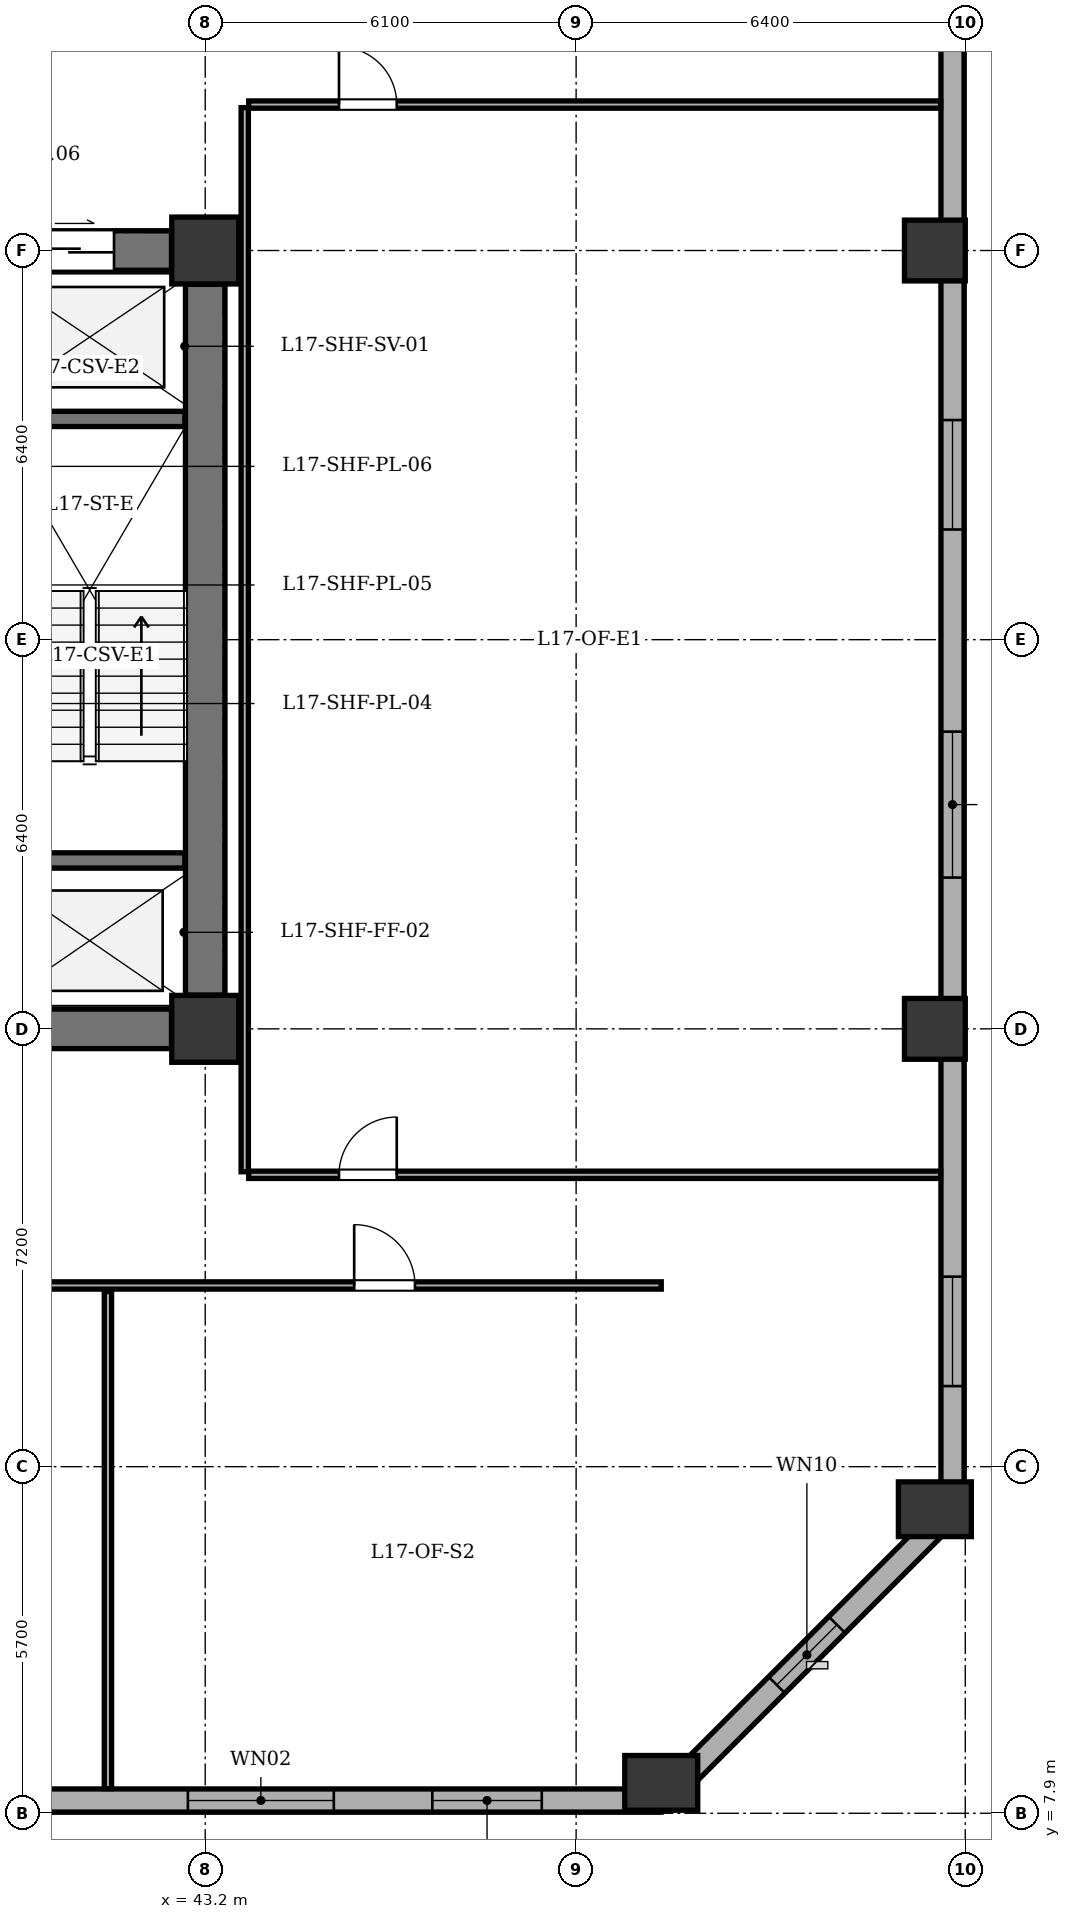
"""IFC4 building model, lengths in metres.
Left out: names, types, materials, properties, quantities, classifications, styles, units other than length and angle.
Written with IfcOpenShell. Run it as: python <this file> out.ifc"""

import sys

from ifc_helpers import new_model, si_unit, direction, frame, frame_2d, origin, origin_2d, place, context, subcontext, project, spatial, rectangle, extrude, element, fill, save


model = new_model("IFC4")
c1 = context("Model", 3, precision=1e-05, world=origin(), true_north=direction((0.0, 1.0)))
c2 = subcontext(c1, "Body", "Model", "MODEL_VIEW")
j1 = project(units=[si_unit("LENGTHUNIT", "METRE"), si_unit("PLANEANGLEUNIT", "RADIAN")], contexts=[c1])
p1 = place(None, origin())
s1 = spatial("IfcSite", under=j1, at=p1, CompositionType="ELEMENT")
p2 = place(p1, origin())
s2 = spatial("IfcBuilding", under=s1, at=p2, CompositionType="ELEMENT")
p3 = place(p2, frame((0.0, 0.0, 71.1)))
s3 = spatial("IfcBuildingStorey", under=s2, at=p3, CompositionType="ELEMENT", Elevation=71.1)
for number, where, z_axis, x_axis in (
    (1, (43.2, 20.8, 0.0), (0.0, 0.0, 1.0), (1.0, 0.0, 0.0)),
    (2, (43.2, 33.6, 0.0), (0.0, 0.0, 1.0), (1.0, 0.0, 0.0)),
):
    element("IfcColumn", number, at=place(p3, frame(where, z_axis=z_axis, x_axis=x_axis)), inside=s3, PredefinedType="COLUMN", context=c2, shape_type="SweptSolid", body=[
        extrude(rectangle(XDim=1.1, YDim=1.1, at=origin_2d()), origin(), (0.0, 0.0, 1.0), 3.9),
    ])
for number, where, z_axis, x_axis in (
    (3, (50.7, 8.4, 0.0), (0.0, 0.0, 1.0), (1.0, 0.0, 0.0)),
    (4, (55.2, 12.9, 0.0), (0.0, 0.0, 1.0), (1.0, 0.0, 0.0)),
):
    element("IfcColumn", number, at=place(p3, frame(where, z_axis=z_axis, x_axis=x_axis)), inside=s3, PredefinedType="COLUMN", context=c2, shape_type="SweptSolid", body=[
        extrude(rectangle(XDim=0.9, YDim=1.2, at=origin_2d()), origin(), (0.0, 0.0, 1.0), 3.9),
    ])
for number, where, z_axis, x_axis in (
    (5, (55.2, 20.8, 0.0), (0.0, 0.0, 1.0), (1.0, 0.0, 0.0)),
    (6, (55.2, 33.6, 0.0), (0.0, 0.0, 1.0), (1.0, 0.0, 0.0)),
):
    element("IfcColumn", number, at=place(p3, frame(where, z_axis=z_axis, x_axis=x_axis)), inside=s3, PredefinedType="COLUMN", context=c2, shape_type="SweptSolid", body=[
        extrude(rectangle(XDim=1.0, YDim=1.0, at=origin_2d()), origin(), (0.0, 0.0, 1.0), 3.9),
    ])
p4 = place(p3, frame((50.7, 8.11, 0.0), z_axis=(0.0, 0.0, 1.0), x_axis=(-1.0, 0.0, 0.0)))
e7 = element("IfcWall", 7, at=p4, inside=s3, PredefinedType="STANDARD", context=c2, shape_type="SweptSolid", body=[
    extrude(rectangle(XDim=35.0, YDim=0.38, at=frame_2d((17.5, 0.0))), origin(), (0.0, 0.0, 1.0), 3.135),
])
p5 = place(p4, frame((24.65, 0.0, 0.0)))
e8 = element("IfcOpeningElement", 8, at=p5, cuts=e7, PredefinedType="OPENING", context=c2, shape_type="SweptSolid", body=[
    extrude(rectangle(XDim=1.1, YDim=2.05, at=frame_2d((0.55, 1.025))), frame((0.0, 0.2, 0.0), z_axis=(0.0, -1.0, 0.0), x_axis=(1.0, 0.0, 0.0)), (0.0, 0.0, 1.0), 0.4),
])
p6 = place(p4, frame((1.965, 0.0, 0.8)))
e9 = element("IfcOpeningElement", 9, at=p6, cuts=e7, PredefinedType="OPENING", context=c2, shape_type="SweptSolid", body=[
    extrude(rectangle(XDim=1.8, YDim=1.9, at=frame_2d((0.9, 0.95))), frame((0.0, 0.2, 0.0), z_axis=(0.0, -1.0, 0.0), x_axis=(1.0, 0.0, 0.0)), (0.0, 0.0, 1.0), 0.4),
])
p7 = place(p4, frame((5.385, 0.0, 0.8)))
e10 = element("IfcOpeningElement", 10, at=p7, cuts=e7, PredefinedType="OPENING", context=c2, shape_type="SweptSolid", body=[
    extrude(rectangle(XDim=2.4, YDim=1.9, at=frame_2d((1.2, 0.95))), frame((0.0, 0.2, 0.0), z_axis=(0.0, -1.0, 0.0), x_axis=(1.0, 0.0, 0.0)), (0.0, 0.0, 1.0), 0.4),
])
p8 = place(p4, frame((11.275, 0.0, 0.8)))
e11 = element("IfcOpeningElement", 11, at=p8, cuts=e7, PredefinedType="OPENING", context=c2, shape_type="SweptSolid", body=[
    extrude(rectangle(XDim=1.8, YDim=1.9, at=frame_2d((0.9, 0.95))), frame((0.0, 0.2, 0.0), z_axis=(0.0, -1.0, 0.0), x_axis=(1.0, 0.0, 0.0)), (0.0, 0.0, 1.0), 0.4),
])
p9 = place(p4, frame((16.832, 0.0, 0.8)))
e12 = element("IfcOpeningElement", 12, at=p9, cuts=e7, PredefinedType="OPENING", context=c2, shape_type="SweptSolid", body=[
    extrude(rectangle(XDim=1.8, YDim=1.9, at=frame_2d((0.9, 0.95))), frame((0.0, 0.2, 0.0), z_axis=(0.0, -1.0, 0.0), x_axis=(1.0, 0.0, 0.0)), (0.0, 0.0, 1.0), 0.4),
])
p10 = place(p4, frame((19.568, 0.0, 0.8)))
e13 = element("IfcOpeningElement", 13, at=p10, cuts=e7, PredefinedType="OPENING", context=c2, shape_type="SweptSolid", body=[
    extrude(rectangle(XDim=1.8, YDim=1.9, at=frame_2d((0.9, 0.95))), frame((0.0, 0.2, 0.0), z_axis=(0.0, -1.0, 0.0), x_axis=(1.0, 0.0, 0.0)), (0.0, 0.0, 1.0), 0.4),
])
p11 = place(p4, frame((26.925, 0.0, 0.8)))
e14 = element("IfcOpeningElement", 14, at=p11, cuts=e7, PredefinedType="OPENING", context=c2, shape_type="SweptSolid", body=[
    extrude(rectangle(XDim=1.8, YDim=1.9, at=frame_2d((0.9, 0.95))), frame((0.0, 0.2, 0.0), z_axis=(0.0, -1.0, 0.0), x_axis=(1.0, 0.0, 0.0)), (0.0, 0.0, 1.0), 0.4),
])
p12 = place(p4, frame((31.5, 0.0, 0.8)))
e15 = element("IfcOpeningElement", 15, at=p12, cuts=e7, PredefinedType="OPENING", context=c2, shape_type="SweptSolid", body=[
    extrude(rectangle(XDim=1.8, YDim=1.9, at=frame_2d((0.9, 0.95))), frame((0.0, 0.2, 0.0), z_axis=(0.0, -1.0, 0.0), x_axis=(1.0, 0.0, 0.0)), (0.0, 0.0, 1.0), 0.4),
])
p13 = place(p3, frame((55.49, 47.9, 0.0), z_axis=(0.0, 0.0, 1.0), x_axis=(0.0, -1.0, 0.0)))
e16 = element("IfcWall", 16, at=p13, inside=s3, PredefinedType="STANDARD", context=c2, shape_type="SweptSolid", body=[
    extrude(rectangle(XDim=35.0, YDim=0.38, at=frame_2d((17.5, 0.0))), origin(), (0.0, 0.0, 1.0), 3.135),
])
p14 = place(p13, frame((2.693, 0.0, 0.8)))
e17 = element("IfcOpeningElement", 17, at=p14, cuts=e16, PredefinedType="OPENING", context=c2, shape_type="SweptSolid", body=[
    extrude(rectangle(XDim=1.8, YDim=1.9, at=frame_2d((0.9, 0.95))), frame((0.0, 0.2, 0.0), z_axis=(0.0, -1.0, 0.0), x_axis=(1.0, 0.0, 0.0)), (0.0, 0.0, 1.0), 0.4),
])
p15 = place(p13, frame((7.457, 0.0, 0.8)))
e18 = element("IfcOpeningElement", 18, at=p15, cuts=e16, PredefinedType="OPENING", context=c2, shape_type="SweptSolid", body=[
    extrude(rectangle(XDim=2.4, YDim=1.9, at=frame_2d((1.2, 0.95))), frame((0.0, 0.2, 0.0), z_axis=(0.0, -1.0, 0.0), x_axis=(1.0, 0.0, 0.0)), (0.0, 0.0, 1.0), 0.4),
])
p16 = place(p13, frame((17.088, 0.0, 0.8)))
e19 = element("IfcOpeningElement", 19, at=p16, cuts=e16, PredefinedType="OPENING", context=c2, shape_type="SweptSolid", body=[
    extrude(rectangle(XDim=1.8, YDim=1.9, at=frame_2d((0.9, 0.95))), frame((0.0, 0.2, 0.0), z_axis=(0.0, -1.0, 0.0), x_axis=(1.0, 0.0, 0.0)), (0.0, 0.0, 1.0), 0.4),
])
p17 = place(p13, frame((22.212, 0.0, 0.8)))
e20 = element("IfcOpeningElement", 20, at=p17, cuts=e16, PredefinedType="OPENING", context=c2, shape_type="SweptSolid", body=[
    extrude(rectangle(XDim=2.4, YDim=1.9, at=frame_2d((1.2, 0.95))), frame((0.0, 0.2, 0.0), z_axis=(0.0, -1.0, 0.0), x_axis=(1.0, 0.0, 0.0)), (0.0, 0.0, 1.0), 0.4),
])
p18 = place(p13, frame((31.175, 0.0, 0.8)))
e21 = element("IfcOpeningElement", 21, at=p18, cuts=e16, PredefinedType="OPENING", context=c2, shape_type="SweptSolid", body=[
    extrude(rectangle(XDim=1.8, YDim=1.9, at=frame_2d((0.9, 0.95))), frame((0.0, 0.2, 0.0), z_axis=(0.0, -1.0, 0.0), x_axis=(1.0, 0.0, 0.0)), (0.0, 0.0, 1.0), 0.4),
])
p19 = place(p3, frame((55.49, 12.9, 0.0), z_axis=(0.0, 0.0, 1.0), x_axis=(-0.707124801467, -0.707088760447, 0.0)))
e22 = element("IfcWall", 22, at=p19, inside=s3, PredefinedType="STANDARD", context=c2, shape_type="SweptSolid", body=[
    extrude(rectangle(XDim=6.774, YDim=0.38, at=frame_2d((3.387, 0.0))), origin(), (0.0, 0.0, 1.0), 3.135),
])
p20 = place(p19, frame((2.687, 0.0, 0.8)))
e23 = element("IfcOpeningElement", 23, at=p20, cuts=e22, PredefinedType="OPENING", context=c2, shape_type="SweptSolid", body=[
    extrude(rectangle(XDim=1.4, YDim=1.65, at=frame_2d((0.7, 0.825))), frame((0.0, 0.2, 0.0), z_axis=(0.0, -1.0, 0.0), x_axis=(1.0, 0.0, 0.0)), (0.0, 0.0, 1.0), 0.4),
])
p21 = place(p3, frame((43.2, 21.355, 0.0), z_axis=(0.0, 0.0, 1.0), x_axis=(0.0, 1.0, 0.0)))
e24 = element("IfcWall", 24, at=p21, inside=s3, PredefinedType="SHEAR", context=c2, shape_type="SweptSolid", body=[
    extrude(rectangle(XDim=11.69, YDim=0.65, at=frame_2d((5.845, 0.0))), origin(), (0.0, 0.0, 1.0), 3.6),
])
p22 = place(p3, frame((35.755, 20.8, 0.0), z_axis=(0.0, 0.0, 1.0), x_axis=(1.0, 0.0, 0.0)))
e25 = element("IfcWall", 25, at=p22, inside=s3, PredefinedType="SHEAR", context=c2, shape_type="SweptSolid", body=[
    extrude(rectangle(XDim=6.89, YDim=0.65, at=frame_2d((3.445, 0.0))), origin(), (0.0, 0.0, 1.0), 3.6),
])
p23 = place(p3, frame((35.755, 33.6, 0.0), z_axis=(0.0, 0.0, 1.0), x_axis=(1.0, 0.0, 0.0)))
e26 = element("IfcWall", 26, at=p23, inside=s3, PredefinedType="SHEAR", context=c2, shape_type="SweptSolid", body=[
    extrude(rectangle(XDim=6.89, YDim=0.65, at=frame_2d((3.445, 0.0))), origin(), (0.0, 0.0, 1.0), 3.6),
])
p24 = place(p23, frame((4.645, 0.0, 0.0)))
e27 = element("IfcOpeningElement", 27, at=p24, cuts=e26, PredefinedType="OPENING", context=c2, shape_type="SweptSolid", body=[
    extrude(rectangle(XDim=1.3, YDim=2.15, at=frame_2d((0.65, 1.075))), frame((0.0, 0.335, 0.0), z_axis=(0.0, -1.0, 0.0), x_axis=(1.0, 0.0, 0.0)), (0.0, 0.0, 1.0), 0.67),
])
p25 = place(p23, frame((2.445, 0.0, 0.0)))
e28 = element("IfcOpeningElement", 28, at=p25, cuts=e26, PredefinedType="OPENING", context=c2, shape_type="SweptSolid", body=[
    extrude(rectangle(XDim=0.85, YDim=2.02, at=frame_2d((0.425, 1.01))), frame((0.0, 0.335, 0.0), z_axis=(0.0, -1.0, 0.0), x_axis=(1.0, 0.0, 0.0)), (0.0, 0.0, 1.0), 0.67),
])
for number, where, z_axis, x_axis in (
    (29, (39.69, 23.57, 0.0), (0.0, 0.0, 1.0), (1.0, 0.0, 0.0)),
    (30, (39.69, 30.83, 0.0), (0.0, 0.0, 1.0), (1.0, 0.0, 0.0)),
):
    element("IfcWall", number, at=place(p3, frame(where, z_axis=z_axis, x_axis=x_axis)), inside=s3, PredefinedType="SHEAR", context=c2, shape_type="SweptSolid", body=[
        extrude(rectangle(XDim=3.175, YDim=0.25, at=frame_2d((1.587, 0.0))), origin(), (0.0, 0.0, 1.0), 3.6),
    ])
p26 = place(p3, frame((15.7, 16.58, 0.0), z_axis=(0.0, 0.0, 1.0), x_axis=(1.0, 0.0, 0.0)))
e31 = element("IfcWall", 31, at=p26, inside=s3, PredefinedType="PARTITIONING", context=c2, shape_type="SweptSolid", body=[
    extrude(rectangle(XDim=35.0, YDim=0.12, at=frame_2d((17.5, 0.0))), origin(), (0.0, 0.0, 1.0), 3.6),
])
p27 = place(p26, frame((12.45, 0.0, 0.0)))
e32 = element("IfcOpeningElement", 32, at=p27, cuts=e31, PredefinedType="OPENING", context=c2, shape_type="SweptSolid", body=[
    extrude(rectangle(XDim=1.0, YDim=2.1, at=frame_2d((0.5, 1.05))), frame((0.0, 0.07, 0.0), z_axis=(0.0, -1.0, 0.0), x_axis=(1.0, 0.0, 0.0)), (0.0, 0.0, 1.0), 0.14),
])
p28 = place(p26, frame((29.95, 0.0, 0.0)))
e33 = element("IfcOpeningElement", 33, at=p28, cuts=e31, PredefinedType="OPENING", context=c2, shape_type="SweptSolid", body=[
    extrude(rectangle(XDim=1.0, YDim=2.1, at=frame_2d((0.5, 1.05))), frame((0.0, 0.07, 0.0), z_axis=(0.0, -1.0, 0.0), x_axis=(1.0, 0.0, 0.0)), (0.0, 0.0, 1.0), 0.14),
])
p29 = place(p3, frame((41.6, 8.305, 0.0), z_axis=(0.0, 0.0, 1.0), x_axis=(0.0, 1.0, 0.0)))
e34 = element("IfcWall", 34, at=p29, inside=s3, PredefinedType="PARTITIONING", context=c2, shape_type="SweptSolid", body=[
    extrude(rectangle(XDim=8.175, YDim=0.12, at=frame_2d((4.087, 0.0))), origin(), (0.0, 0.0, 1.0), 3.6),
])
p30 = place(p3, frame((43.85, 18.45, 0.0), z_axis=(0.0, 0.0, 1.0), x_axis=(0.0, 1.0, 0.0)))
e35 = element("IfcWall", 35, at=p30, inside=s3, PredefinedType="PARTITIONING", context=c2, shape_type="SweptSolid", body=[
    extrude(rectangle(XDim=17.5, YDim=0.12, at=frame_2d((8.75, 0.0))), origin(), (0.0, 0.0, 1.0), 3.6),
])
p31 = place(p3, frame((43.915, 18.4, 0.0), z_axis=(0.0, 0.0, 1.0), x_axis=(1.0, 0.0, 0.0)))
e36 = element("IfcWall", 36, at=p31, inside=s3, PredefinedType="PARTITIONING", context=c2, shape_type="SweptSolid", body=[
    extrude(rectangle(XDim=11.38, YDim=0.12, at=frame_2d((5.69, 0.0))), origin(), (0.0, 0.0, 1.0), 3.6),
])
p32 = place(p31, frame((1.485, 0.0, 0.0)))
e37 = element("IfcOpeningElement", 37, at=p32, cuts=e36, PredefinedType="OPENING", context=c2, shape_type="SweptSolid", body=[
    extrude(rectangle(XDim=0.95, YDim=2.1, at=frame_2d((0.475, 1.05))), frame((0.0, 0.07, 0.0), z_axis=(0.0, -1.0, 0.0), x_axis=(1.0, 0.0, 0.0)), (0.0, 0.0, 1.0), 0.14),
])
p33 = place(p3, frame((43.915, 36.0, 0.0), z_axis=(0.0, 0.0, 1.0), x_axis=(1.0, 0.0, 0.0)))
e38 = element("IfcWall", 38, at=p33, inside=s3, PredefinedType="PARTITIONING", context=c2, shape_type="SweptSolid", body=[
    extrude(rectangle(XDim=11.38, YDim=0.12, at=frame_2d((5.69, 0.0))), origin(), (0.0, 0.0, 1.0), 3.6),
])
p34 = place(p33, frame((1.485, 0.0, 0.0)))
e39 = element("IfcOpeningElement", 39, at=p34, cuts=e38, PredefinedType="OPENING", context=c2, shape_type="SweptSolid", body=[
    extrude(rectangle(XDim=0.95, YDim=2.1, at=frame_2d((0.475, 1.05))), frame((0.0, 0.07, 0.0), z_axis=(0.0, -1.0, 0.0), x_axis=(1.0, 0.0, 0.0)), (0.0, 0.0, 1.0), 0.14),
])
p35 = place(p6, origin())
e40 = element("IfcWindow", 40, at=p35, inside=s3, PartitioningType="SINGLE_PANEL", PredefinedType="WINDOW", context=c2, shape_type="SweptSolid", body=[
    extrude(rectangle(XDim=1.8, YDim=1.9, at=frame_2d((0.9, 0.95))), frame((0.0, -0.01, 0.0), z_axis=(0.0, -1.0, 0.0), x_axis=(1.0, 0.0, 0.0)), (0.0, 0.0, 1.0), 0.06),
])
fill(e9, e40)
p36 = place(p7, origin())
e41 = element("IfcWindow", 41, at=p36, inside=s3, PartitioningType="SINGLE_PANEL", PredefinedType="WINDOW", context=c2, shape_type="SweptSolid", body=[
    extrude(rectangle(XDim=2.4, YDim=1.9, at=frame_2d((1.2, 0.95))), frame((0.0, -0.01, 0.0), z_axis=(0.0, -1.0, 0.0), x_axis=(1.0, 0.0, 0.0)), (0.0, 0.0, 1.0), 0.06),
])
fill(e10, e41)
p37 = place(p16, origin())
e42 = element("IfcWindow", 42, at=p37, inside=s3, PartitioningType="SINGLE_PANEL", PredefinedType="WINDOW", context=c2, shape_type="SweptSolid", body=[
    extrude(rectangle(XDim=1.8, YDim=1.9, at=frame_2d((0.9, 0.95))), frame((0.0, -0.01, 0.0), z_axis=(0.0, -1.0, 0.0), x_axis=(1.0, 0.0, 0.0)), (0.0, 0.0, 1.0), 0.06),
])
fill(e19, e42)
p38 = place(p17, origin())
e43 = element("IfcWindow", 43, at=p38, inside=s3, PartitioningType="SINGLE_PANEL", PredefinedType="WINDOW", context=c2, shape_type="SweptSolid", body=[
    extrude(rectangle(XDim=2.4, YDim=1.9, at=frame_2d((1.2, 0.95))), frame((0.0, -0.01, 0.0), z_axis=(0.0, -1.0, 0.0), x_axis=(1.0, 0.0, 0.0)), (0.0, 0.0, 1.0), 0.06),
])
fill(e20, e43)
p39 = place(p18, origin())
e44 = element("IfcWindow", 44, at=p39, inside=s3, PartitioningType="SINGLE_PANEL", PredefinedType="WINDOW", context=c2, shape_type="SweptSolid", body=[
    extrude(rectangle(XDim=1.8, YDim=1.9, at=frame_2d((0.9, 0.95))), frame((0.0, -0.01, 0.0), z_axis=(0.0, -1.0, 0.0), x_axis=(1.0, 0.0, 0.0)), (0.0, 0.0, 1.0), 0.06),
])
fill(e21, e44)
p40 = place(p20, origin())
e45 = element("IfcWindow", 45, at=p40, inside=s3, PartitioningType="SINGLE_PANEL", PredefinedType="WINDOW", context=c2, shape_type="SweptSolid", body=[
    extrude(rectangle(XDim=1.4, YDim=1.65, at=frame_2d((0.7, 0.825))), frame((0.0, -0.01, 0.0), z_axis=(0.0, -1.0, 0.0), x_axis=(1.0, 0.0, 0.0)), (0.0, 0.0, 1.0), 0.06),
])
fill(e23, e45)
p41 = place(p24, origin())
e46 = element("IfcDoor", 46, at=p41, inside=s3, OperationType="DOUBLE_DOOR_SLIDING", PredefinedType="DOOR", context=c2, shape_type="SweptSolid", body=[
    extrude(rectangle(XDim=1.3, YDim=2.15, at=frame_2d((0.65, 1.075))), frame((0.0, 0.025, 0.0), z_axis=(0.0, -1.0, 0.0), x_axis=(1.0, 0.0, 0.0)), (0.0, 0.0, 1.0), 0.05),
])
fill(e27, e46)
p42 = place(p28, origin())
e47 = element("IfcDoor", 47, at=p42, inside=s3, OperationType="SINGLE_SWING_LEFT", PredefinedType="DOOR", context=c2, shape_type="SweptSolid", body=[
    extrude(rectangle(XDim=1.0, YDim=2.1, at=frame_2d((0.5, 1.05))), frame((0.0, 0.025, 0.0), z_axis=(0.0, -1.0, 0.0), x_axis=(1.0, 0.0, 0.0)), (0.0, 0.0, 1.0), 0.05),
])
fill(e33, e47)
p43 = place(p32, origin())
e48 = element("IfcDoor", 48, at=p43, inside=s3, OperationType="SINGLE_SWING_RIGHT", PredefinedType="DOOR", context=c2, shape_type="SweptSolid", body=[
    extrude(rectangle(XDim=0.95, YDim=2.1, at=frame_2d((0.475, 1.05))), frame((0.0, 0.025, 0.0), z_axis=(0.0, -1.0, 0.0), x_axis=(1.0, 0.0, 0.0)), (0.0, 0.0, 1.0), 0.05),
])
fill(e37, e48)
p44 = place(p34, origin())
e49 = element("IfcDoor", 49, at=p44, inside=s3, OperationType="SINGLE_SWING_LEFT", PredefinedType="DOOR", context=c2, shape_type="SweptSolid", body=[
    extrude(rectangle(XDim=0.95, YDim=2.1, at=frame_2d((0.475, 1.05))), frame((0.0, 0.025, 0.0), z_axis=(0.0, -1.0, 0.0), x_axis=(1.0, 0.0, 0.0)), (0.0, 0.0, 1.0), 0.05),
])
fill(e39, e49)
save(model, sys.argv[1])
